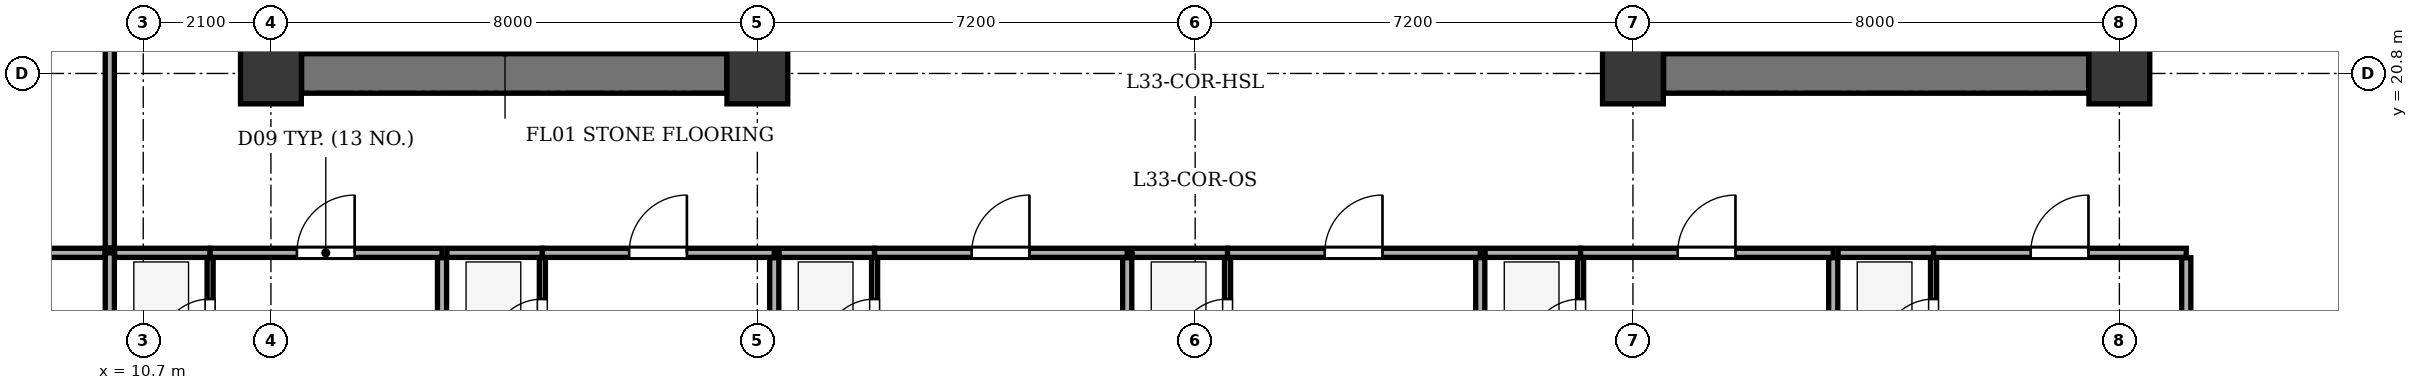
"""IFC4 building model, lengths in metres.
Left out: names, types, materials, properties, quantities, classifications, styles, units other than length and angle.
Written with IfcOpenShell. Run it as: python <this file> out.ifc"""

import sys

from ifc_helpers import new_model, si_unit, direction, frame, frame_2d, origin, origin_2d, place, context, subcontext, project, spatial, rectangle, extrude, element, fill, save


model = new_model("IFC4")
c1 = context("Model", 3, precision=1e-05, world=origin(), true_north=direction((0.0, 1.0)))
c2 = subcontext(c1, "Body", "Model", "MODEL_VIEW")
j1 = project(units=[si_unit("LENGTHUNIT", "METRE"), si_unit("PLANEANGLEUNIT", "RADIAN")], contexts=[c1])
p1 = place(None, origin())
s1 = spatial("IfcSite", under=j1, at=p1, CompositionType="ELEMENT")
p2 = place(p1, origin())
s2 = spatial("IfcBuilding", under=s1, at=p2, CompositionType="ELEMENT")
p3 = place(p2, frame((0.0, 0.0, 134.3)))
s3 = spatial("IfcBuildingStorey", under=s2, at=p3, CompositionType="ELEMENT", Elevation=134.3)
for number, where, z_axis, x_axis in (
    (1, (12.8, 20.8, 0.0), (0.0, 0.0, 1.0), (1.0, 0.0, 0.0)),
    (2, (20.8, 20.8, 0.0), (0.0, 0.0, 1.0), (1.0, 0.0, 0.0)),
    (3, (35.2, 20.8, 0.0), (0.0, 0.0, 1.0), (1.0, 0.0, 0.0)),
    (4, (43.2, 20.8, 0.0), (0.0, 0.0, 1.0), (1.0, 0.0, 0.0)),
):
    element("IfcColumn", number, at=place(p3, frame(where, z_axis=z_axis, x_axis=x_axis)), inside=s3, PredefinedType="COLUMN", context=c2, shape_type="SweptSolid", body=[
        extrude(rectangle(XDim=1.0, YDim=1.0, at=origin_2d()), origin(), (0.0, 0.0, 1.0), 3.5),
    ])
p4 = place(p3, frame((13.305, 20.8, 0.0), z_axis=(0.0, 0.0, 1.0), x_axis=(1.0, 0.0, 0.0)))
e5 = element("IfcWall", 5, at=p4, inside=s3, PredefinedType="SHEAR", context=c2, shape_type="SweptSolid", body=[
    extrude(rectangle(XDim=6.99, YDim=0.65, at=frame_2d((3.495, 0.0))), origin(), (0.0, 0.0, 1.0), 3.2),
])
p5 = place(p3, frame((16.435, 21.135, 0.0), z_axis=(0.0, 0.0, 1.0), x_axis=(0.0, 1.0, 0.0)))
e6 = element("IfcWall", 6, at=p5, inside=s3, PredefinedType="SHEAR", context=c2, shape_type="SweptSolid", body=[
    extrude(rectangle(XDim=12.13, YDim=0.25, at=frame_2d((6.065, 0.0))), origin(), (0.0, 0.0, 1.0), 3.2),
])
p6 = place(p5, frame((0.515, 0.0, 0.0)))
e7 = element("IfcOpeningElement", 7, at=p6, cuts=e6, PredefinedType="OPENING", context=c2, shape_type="SweptSolid", body=[
    extrude(rectangle(XDim=1.2, YDim=2.15, at=frame_2d((0.6, 1.075))), frame((0.0, 0.135, 0.0), z_axis=(0.0, -1.0, 0.0), x_axis=(1.0, 0.0, 0.0)), (0.0, 0.0, 1.0), 0.27),
])
p7 = place(p5, frame((2.665, 0.0, 0.0)))
e8 = element("IfcOpeningElement", 8, at=p7, cuts=e6, PredefinedType="OPENING", context=c2, shape_type="SweptSolid", body=[
    extrude(rectangle(XDim=1.15, YDim=2.15, at=frame_2d((0.575, 1.075))), frame((0.0, 0.135, 0.0), z_axis=(0.0, -1.0, 0.0), x_axis=(1.0, 0.0, 0.0)), (0.0, 0.0, 1.0), 0.27),
])
p8 = place(p3, frame((35.705, 20.8, 0.0), z_axis=(0.0, 0.0, 1.0), x_axis=(1.0, 0.0, 0.0)))
e9 = element("IfcWall", 9, at=p8, inside=s3, PredefinedType="SHEAR", context=c2, shape_type="SweptSolid", body=[
    extrude(rectangle(XDim=6.99, YDim=0.65, at=frame_2d((3.495, 0.0))), origin(), (0.0, 0.0, 1.0), 3.2),
])
p9 = place(p3, frame((39.565, 21.135, 0.0), z_axis=(0.0, 0.0, 1.0), x_axis=(0.0, 1.0, 0.0)))
e10 = element("IfcWall", 10, at=p9, inside=s3, PredefinedType="SHEAR", context=c2, shape_type="SweptSolid", body=[
    extrude(rectangle(XDim=12.13, YDim=0.25, at=frame_2d((6.065, 0.0))), origin(), (0.0, 0.0, 1.0), 3.2),
])
p10 = place(p9, frame((0.515, 0.0, 0.0)))
e11 = element("IfcOpeningElement", 11, at=p10, cuts=e10, PredefinedType="OPENING", context=c2, shape_type="SweptSolid", body=[
    extrude(rectangle(XDim=1.2, YDim=2.15, at=frame_2d((0.6, 1.075))), frame((0.0, 0.135, 0.0), z_axis=(0.0, -1.0, 0.0), x_axis=(1.0, 0.0, 0.0)), (0.0, 0.0, 1.0), 0.27),
])
p11 = place(p9, frame((2.665, 0.0, 0.0)))
e12 = element("IfcOpeningElement", 12, at=p11, cuts=e10, PredefinedType="OPENING", context=c2, shape_type="SweptSolid", body=[
    extrude(rectangle(XDim=1.15, YDim=2.15, at=frame_2d((0.575, 1.075))), frame((0.0, 0.135, 0.0), z_axis=(0.0, -1.0, 0.0), x_axis=(1.0, 0.0, 0.0)), (0.0, 0.0, 1.0), 0.27),
])
p12 = place(p3, frame((10.15, 1.875, 0.0), z_axis=(0.0, 0.0, 1.0), x_axis=(0.0, 1.0, 0.0)))
e13 = element("IfcWall", 13, at=p12, inside=s3, PredefinedType="PARTITIONING", context=c2, shape_type="SweptSolid", body=[
    extrude(rectangle(XDim=15.975, YDim=0.15, at=frame_2d((7.988, 0.0))), origin(), (0.0, 0.0, 1.0), 3.2),
])
p13 = place(p3, frame((10.23, 17.85, 0.0), z_axis=(0.0, 0.0, 1.0), x_axis=(1.0, 0.0, 0.0)))
e14 = element("IfcWall", 14, at=p13, inside=s3, PredefinedType="PARTITIONING", context=c2, shape_type="SweptSolid", body=[
    extrude(rectangle(XDim=1.57, YDim=0.15, at=frame_2d((0.785, 0.0))), origin(), (0.0, 0.0, 1.0), 3.2),
])
p14 = place(p3, frame((11.8, 17.85, 0.0), z_axis=(0.0, 0.0, 1.0), x_axis=(1.0, 0.0, 0.0)))
e15 = element("IfcWall", 15, at=p14, inside=s3, PredefinedType="PARTITIONING", context=c2, shape_type="SweptSolid", body=[
    extrude(rectangle(XDim=3.814, YDim=0.15, at=frame_2d((1.907, 0.0))), origin(), (0.0, 0.0, 1.0), 3.2),
])
p15 = place(p14, frame((1.427, 0.0, 0.0)))
e16 = element("IfcOpeningElement", 16, at=p15, cuts=e15, PredefinedType="OPENING", context=c2, shape_type="SweptSolid", body=[
    extrude(rectangle(XDim=0.95, YDim=2.1, at=frame_2d((0.475, 1.05))), frame((0.0, 0.085, 0.0), z_axis=(0.0, -1.0, 0.0), x_axis=(1.0, 0.0, 0.0)), (0.0, 0.0, 1.0), 0.17),
])
p16 = place(p3, frame((11.8, 15.52, 0.0), z_axis=(0.0, 0.0, 1.0), x_axis=(0.0, 1.0, 0.0)))
e17 = element("IfcWall", 17, at=p16, inside=s3, PredefinedType="PARTITIONING", context=c2, shape_type="SweptSolid", body=[
    extrude(rectangle(XDim=2.25, YDim=0.1, at=frame_2d((1.125, 0.0))), origin(), (0.0, 0.0, 1.0), 3.2),
])
p17 = place(p16, frame((0.72, 0.0, 0.0)))
e18 = element("IfcOpeningElement", 18, at=p17, cuts=e17, PredefinedType="OPENING", context=c2, shape_type="SweptSolid", body=[
    extrude(rectangle(XDim=0.85, YDim=2.05, at=frame_2d((0.425, 1.025))), frame((0.0, 0.06, 0.0), z_axis=(0.0, -1.0, 0.0), x_axis=(1.0, 0.0, 0.0)), (0.0, 0.0, 1.0), 0.12),
])
p18 = place(p3, frame((15.614, 1.875, 0.0), z_axis=(0.0, 0.0, 1.0), x_axis=(0.0, 1.0, 0.0)))
e19 = element("IfcWall", 19, at=p18, inside=s3, PredefinedType="PARTITIONING", context=c2, shape_type="SweptSolid", body=[
    extrude(rectangle(XDim=15.895, YDim=0.15, at=frame_2d((7.948, 0.0))), origin(), (0.0, 0.0, 1.0), 3.2),
])
p19 = place(p3, frame((15.694, 17.85, 0.0), z_axis=(0.0, 0.0, 1.0), x_axis=(1.0, 0.0, 0.0)))
e20 = element("IfcWall", 20, at=p19, inside=s3, PredefinedType="PARTITIONING", context=c2, shape_type="SweptSolid", body=[
    extrude(rectangle(XDim=1.57, YDim=0.15, at=frame_2d((0.785, 0.0))), origin(), (0.0, 0.0, 1.0), 3.2),
])
p20 = place(p3, frame((17.264, 17.85, 0.0), z_axis=(0.0, 0.0, 1.0), x_axis=(1.0, 0.0, 0.0)))
e21 = element("IfcWall", 21, at=p20, inside=s3, PredefinedType="PARTITIONING", context=c2, shape_type="SweptSolid", body=[
    extrude(rectangle(XDim=3.814, YDim=0.15, at=frame_2d((1.907, 0.0))), origin(), (0.0, 0.0, 1.0), 3.2),
])
p21 = place(p20, frame((1.427, 0.0, 0.0)))
e22 = element("IfcOpeningElement", 22, at=p21, cuts=e21, PredefinedType="OPENING", context=c2, shape_type="SweptSolid", body=[
    extrude(rectangle(XDim=0.95, YDim=2.1, at=frame_2d((0.475, 1.05))), frame((0.0, 0.085, 0.0), z_axis=(0.0, -1.0, 0.0), x_axis=(1.0, 0.0, 0.0)), (0.0, 0.0, 1.0), 0.17),
])
p22 = place(p3, frame((17.264, 15.52, 0.0), z_axis=(0.0, 0.0, 1.0), x_axis=(0.0, 1.0, 0.0)))
e23 = element("IfcWall", 23, at=p22, inside=s3, PredefinedType="PARTITIONING", context=c2, shape_type="SweptSolid", body=[
    extrude(rectangle(XDim=2.25, YDim=0.1, at=frame_2d((1.125, 0.0))), origin(), (0.0, 0.0, 1.0), 3.2),
])
p23 = place(p22, frame((0.72, 0.0, 0.0)))
e24 = element("IfcOpeningElement", 24, at=p23, cuts=e23, PredefinedType="OPENING", context=c2, shape_type="SweptSolid", body=[
    extrude(rectangle(XDim=0.85, YDim=2.05, at=frame_2d((0.425, 1.025))), frame((0.0, 0.06, 0.0), z_axis=(0.0, -1.0, 0.0), x_axis=(1.0, 0.0, 0.0)), (0.0, 0.0, 1.0), 0.12),
])
p24 = place(p3, frame((21.078, 1.875, 0.0), z_axis=(0.0, 0.0, 1.0), x_axis=(0.0, 1.0, 0.0)))
e25 = element("IfcWall", 25, at=p24, inside=s3, PredefinedType="PARTITIONING", context=c2, shape_type="SweptSolid", body=[
    extrude(rectangle(XDim=15.895, YDim=0.15, at=frame_2d((7.948, 0.0))), origin(), (0.0, 0.0, 1.0), 2.535),
])
p25 = place(p3, frame((21.158, 17.85, 0.0), z_axis=(0.0, 0.0, 1.0), x_axis=(1.0, 0.0, 0.0)))
e26 = element("IfcWall", 26, at=p25, inside=s3, PredefinedType="PARTITIONING", context=c2, shape_type="SweptSolid", body=[
    extrude(rectangle(XDim=1.57, YDim=0.15, at=frame_2d((0.785, 0.0))), origin(), (0.0, 0.0, 1.0), 3.2),
])
p26 = place(p3, frame((22.728, 17.85, 0.0), z_axis=(0.0, 0.0, 1.0), x_axis=(1.0, 0.0, 0.0)))
e27 = element("IfcWall", 27, at=p26, inside=s3, PredefinedType="PARTITIONING", context=c2, shape_type="SweptSolid", body=[
    extrude(rectangle(XDim=4.155, YDim=0.15, at=frame_2d((2.078, 0.0))), origin(), (0.0, 0.0, 1.0), 3.2),
])
p27 = place(p26, frame((1.597, 0.0, 0.0)))
e28 = element("IfcOpeningElement", 28, at=p27, cuts=e27, PredefinedType="OPENING", context=c2, shape_type="SweptSolid", body=[
    extrude(rectangle(XDim=0.95, YDim=2.1, at=frame_2d((0.475, 1.05))), frame((0.0, 0.085, 0.0), z_axis=(0.0, -1.0, 0.0), x_axis=(1.0, 0.0, 0.0)), (0.0, 0.0, 1.0), 0.17),
])
p28 = place(p3, frame((22.728, 15.52, 0.0), z_axis=(0.0, 0.0, 1.0), x_axis=(0.0, 1.0, 0.0)))
e29 = element("IfcWall", 29, at=p28, inside=s3, PredefinedType="PARTITIONING", context=c2, shape_type="SweptSolid", body=[
    extrude(rectangle(XDim=2.25, YDim=0.1, at=frame_2d((1.125, 0.0))), origin(), (0.0, 0.0, 1.0), 3.2),
])
p29 = place(p28, frame((0.72, 0.0, 0.0)))
e30 = element("IfcOpeningElement", 30, at=p29, cuts=e29, PredefinedType="OPENING", context=c2, shape_type="SweptSolid", body=[
    extrude(rectangle(XDim=0.85, YDim=2.05, at=frame_2d((0.425, 1.025))), frame((0.0, 0.06, 0.0), z_axis=(0.0, -1.0, 0.0), x_axis=(1.0, 0.0, 0.0)), (0.0, 0.0, 1.0), 0.12),
])
p30 = place(p3, frame((26.883, 1.875, 0.0), z_axis=(0.0, 0.0, 1.0), x_axis=(0.0, 1.0, 0.0)))
e31 = element("IfcWall", 31, at=p30, inside=s3, PredefinedType="PARTITIONING", context=c2, shape_type="SweptSolid", body=[
    extrude(rectangle(XDim=15.895, YDim=0.15, at=frame_2d((7.948, 0.0))), origin(), (0.0, 0.0, 1.0), 3.2),
])
p31 = place(p3, frame((26.963, 17.85, 0.0), z_axis=(0.0, 0.0, 1.0), x_axis=(1.0, 0.0, 0.0)))
e32 = element("IfcWall", 32, at=p31, inside=s3, PredefinedType="PARTITIONING", context=c2, shape_type="SweptSolid", body=[
    extrude(rectangle(XDim=1.57, YDim=0.15, at=frame_2d((0.785, 0.0))), origin(), (0.0, 0.0, 1.0), 3.2),
])
p32 = place(p3, frame((28.533, 17.85, 0.0), z_axis=(0.0, 0.0, 1.0), x_axis=(1.0, 0.0, 0.0)))
e33 = element("IfcWall", 33, at=p32, inside=s3, PredefinedType="PARTITIONING", context=c2, shape_type="SweptSolid", body=[
    extrude(rectangle(XDim=4.156, YDim=0.15, at=frame_2d((2.078, 0.0))), origin(), (0.0, 0.0, 1.0), 3.2),
])
p33 = place(p32, frame((1.598, 0.0, 0.0)))
e34 = element("IfcOpeningElement", 34, at=p33, cuts=e33, PredefinedType="OPENING", context=c2, shape_type="SweptSolid", body=[
    extrude(rectangle(XDim=0.95, YDim=2.1, at=frame_2d((0.475, 1.05))), frame((0.0, 0.085, 0.0), z_axis=(0.0, -1.0, 0.0), x_axis=(1.0, 0.0, 0.0)), (0.0, 0.0, 1.0), 0.17),
])
p34 = place(p3, frame((28.533, 15.52, 0.0), z_axis=(0.0, 0.0, 1.0), x_axis=(0.0, 1.0, 0.0)))
e35 = element("IfcWall", 35, at=p34, inside=s3, PredefinedType="PARTITIONING", context=c2, shape_type="SweptSolid", body=[
    extrude(rectangle(XDim=2.25, YDim=0.1, at=frame_2d((1.125, 0.0))), origin(), (0.0, 0.0, 1.0), 3.2),
])
p35 = place(p34, frame((0.72, 0.0, 0.0)))
e36 = element("IfcOpeningElement", 36, at=p35, cuts=e35, PredefinedType="OPENING", context=c2, shape_type="SweptSolid", body=[
    extrude(rectangle(XDim=0.85, YDim=2.05, at=frame_2d((0.425, 1.025))), frame((0.0, 0.06, 0.0), z_axis=(0.0, -1.0, 0.0), x_axis=(1.0, 0.0, 0.0)), (0.0, 0.0, 1.0), 0.12),
])
p36 = place(p3, frame((32.689, 1.875, 0.0), z_axis=(0.0, 0.0, 1.0), x_axis=(0.0, 1.0, 0.0)))
e37 = element("IfcWall", 37, at=p36, inside=s3, PredefinedType="PARTITIONING", context=c2, shape_type="SweptSolid", body=[
    extrude(rectangle(XDim=15.895, YDim=0.15, at=frame_2d((7.948, 0.0))), origin(), (0.0, 0.0, 1.0), 3.2),
])
p37 = place(p3, frame((32.769, 17.85, 0.0), z_axis=(0.0, 0.0, 1.0), x_axis=(1.0, 0.0, 0.0)))
e38 = element("IfcWall", 38, at=p37, inside=s3, PredefinedType="PARTITIONING", context=c2, shape_type="SweptSolid", body=[
    extrude(rectangle(XDim=1.57, YDim=0.15, at=frame_2d((0.785, 0.0))), origin(), (0.0, 0.0, 1.0), 3.2),
])
p38 = place(p3, frame((34.339, 17.85, 0.0), z_axis=(0.0, 0.0, 1.0), x_axis=(1.0, 0.0, 0.0)))
e39 = element("IfcWall", 39, at=p38, inside=s3, PredefinedType="PARTITIONING", context=c2, shape_type="SweptSolid", body=[
    extrude(rectangle(XDim=4.155, YDim=0.15, at=frame_2d((2.077, 0.0))), origin(), (0.0, 0.0, 1.0), 3.2),
])
p39 = place(p38, frame((1.597, 0.0, 0.0)))
e40 = element("IfcOpeningElement", 40, at=p39, cuts=e39, PredefinedType="OPENING", context=c2, shape_type="SweptSolid", body=[
    extrude(rectangle(XDim=0.95, YDim=2.1, at=frame_2d((0.475, 1.05))), frame((0.0, 0.085, 0.0), z_axis=(0.0, -1.0, 0.0), x_axis=(1.0, 0.0, 0.0)), (0.0, 0.0, 1.0), 0.17),
])
p40 = place(p3, frame((34.339, 15.52, 0.0), z_axis=(0.0, 0.0, 1.0), x_axis=(0.0, 1.0, 0.0)))
e41 = element("IfcWall", 41, at=p40, inside=s3, PredefinedType="PARTITIONING", context=c2, shape_type="SweptSolid", body=[
    extrude(rectangle(XDim=2.25, YDim=0.1, at=frame_2d((1.125, 0.0))), origin(), (0.0, 0.0, 1.0), 3.2),
])
p41 = place(p40, frame((0.72, 0.0, 0.0)))
e42 = element("IfcOpeningElement", 42, at=p41, cuts=e41, PredefinedType="OPENING", context=c2, shape_type="SweptSolid", body=[
    extrude(rectangle(XDim=0.85, YDim=2.05, at=frame_2d((0.425, 1.025))), frame((0.0, 0.06, 0.0), z_axis=(0.0, -1.0, 0.0), x_axis=(1.0, 0.0, 0.0)), (0.0, 0.0, 1.0), 0.12),
])
p42 = place(p3, frame((38.494, 1.875, 0.0), z_axis=(0.0, 0.0, 1.0), x_axis=(0.0, 1.0, 0.0)))
e43 = element("IfcWall", 43, at=p42, inside=s3, PredefinedType="PARTITIONING", context=c2, shape_type="SweptSolid", body=[
    extrude(rectangle(XDim=15.895, YDim=0.15, at=frame_2d((7.948, 0.0))), origin(), (0.0, 0.0, 1.0), 3.2),
])
p43 = place(p3, frame((38.574, 17.85, 0.0), z_axis=(0.0, 0.0, 1.0), x_axis=(1.0, 0.0, 0.0)))
e44 = element("IfcWall", 44, at=p43, inside=s3, PredefinedType="PARTITIONING", context=c2, shape_type="SweptSolid", body=[
    extrude(rectangle(XDim=1.57, YDim=0.15, at=frame_2d((0.785, 0.0))), origin(), (0.0, 0.0, 1.0), 3.2),
])
p44 = place(p3, frame((40.144, 17.85, 0.0), z_axis=(0.0, 0.0, 1.0), x_axis=(1.0, 0.0, 0.0)))
e45 = element("IfcWall", 45, at=p44, inside=s3, PredefinedType="PARTITIONING", context=c2, shape_type="SweptSolid", body=[
    extrude(rectangle(XDim=4.156, YDim=0.15, at=frame_2d((2.078, 0.0))), origin(), (0.0, 0.0, 1.0), 3.2),
])
p45 = place(p44, frame((1.598, 0.0, 0.0)))
e46 = element("IfcOpeningElement", 46, at=p45, cuts=e45, PredefinedType="OPENING", context=c2, shape_type="SweptSolid", body=[
    extrude(rectangle(XDim=0.95, YDim=2.1, at=frame_2d((0.475, 1.05))), frame((0.0, 0.085, 0.0), z_axis=(0.0, -1.0, 0.0), x_axis=(1.0, 0.0, 0.0)), (0.0, 0.0, 1.0), 0.17),
])
p46 = place(p3, frame((40.144, 15.52, 0.0), z_axis=(0.0, 0.0, 1.0), x_axis=(0.0, 1.0, 0.0)))
e47 = element("IfcWall", 47, at=p46, inside=s3, PredefinedType="PARTITIONING", context=c2, shape_type="SweptSolid", body=[
    extrude(rectangle(XDim=2.25, YDim=0.1, at=frame_2d((1.125, 0.0))), origin(), (0.0, 0.0, 1.0), 3.2),
])
p47 = place(p46, frame((0.72, 0.0, 0.0)))
e48 = element("IfcOpeningElement", 48, at=p47, cuts=e47, PredefinedType="OPENING", context=c2, shape_type="SweptSolid", body=[
    extrude(rectangle(XDim=0.85, YDim=2.05, at=frame_2d((0.425, 1.025))), frame((0.0, 0.06, 0.0), z_axis=(0.0, -1.0, 0.0), x_axis=(1.0, 0.0, 0.0)), (0.0, 0.0, 1.0), 0.12),
])
p48 = place(p3, frame((44.3, 1.875, 0.0), z_axis=(0.0, 0.0, 1.0), x_axis=(0.0, 1.0, 0.0)))
e49 = element("IfcWall", 49, at=p48, inside=s3, PredefinedType="PARTITIONING", context=c2, shape_type="SweptSolid", body=[
    extrude(rectangle(XDim=15.895, YDim=0.15, at=frame_2d((7.948, 0.0))), origin(), (0.0, 0.0, 1.0), 3.2),
])
p49 = place(p3, frame((4.675, 17.85, 0.0), z_axis=(0.0, 0.0, 1.0), x_axis=(1.0, 0.0, 0.0)))
e50 = element("IfcWall", 50, at=p49, inside=s3, PredefinedType="PARTITIONING", context=c2, shape_type="SweptSolid", body=[
    extrude(rectangle(XDim=5.395, YDim=0.15, at=frame_2d((2.698, 0.0))), origin(), (0.0, 0.0, 1.0), 3.2),
])
p50 = place(p3, frame((10.15, 17.93, 0.0), z_axis=(0.0, 0.0, 1.0), x_axis=(0.0, 1.0, 0.0)))
e51 = element("IfcWall", 51, at=p50, inside=s3, PredefinedType="PARTITIONING", context=c2, shape_type="SweptSolid", body=[
    extrude(rectangle(XDim=9.27, YDim=0.15, at=frame_2d((4.635, 0.0))), origin(), (0.0, 0.0, 1.0), 3.2),
])
p51 = place(p50, frame((4.115, 0.0, 0.0)))
e52 = element("IfcOpeningElement", 52, at=p51, cuts=e51, PredefinedType="OPENING", context=c2, shape_type="SweptSolid", body=[
    extrude(rectangle(XDim=0.95, YDim=2.1, at=frame_2d((0.475, 1.05))), frame((0.0, 0.085, 0.0), z_axis=(0.0, -1.0, 0.0), x_axis=(1.0, 0.0, 0.0)), (0.0, 0.0, 1.0), 0.17),
])
p52 = place(p17, origin())
e53 = element("IfcDoor", 53, at=p52, inside=s3, OperationType="SINGLE_SWING_LEFT", PredefinedType="DOOR", context=c2, shape_type="SweptSolid", body=[
    extrude(rectangle(XDim=0.85, YDim=2.05, at=frame_2d((0.425, 1.025))), frame((0.0, 0.025, 0.0), z_axis=(0.0, -1.0, 0.0), x_axis=(1.0, 0.0, 0.0)), (0.0, 0.0, 1.0), 0.05),
])
fill(e18, e53)
p53 = place(p15, origin())
e54 = element("IfcDoor", 54, at=p53, inside=s3, OperationType="SINGLE_SWING_RIGHT", PredefinedType="DOOR", context=c2, shape_type="SweptSolid", body=[
    extrude(rectangle(XDim=0.95, YDim=2.1, at=frame_2d((0.475, 1.05))), frame((0.0, 0.025, 0.0), z_axis=(0.0, -1.0, 0.0), x_axis=(1.0, 0.0, 0.0)), (0.0, 0.0, 1.0), 0.05),
])
fill(e16, e54)
p54 = place(p23, origin())
e55 = element("IfcDoor", 55, at=p54, inside=s3, OperationType="SINGLE_SWING_LEFT", PredefinedType="DOOR", context=c2, shape_type="SweptSolid", body=[
    extrude(rectangle(XDim=0.85, YDim=2.05, at=frame_2d((0.425, 1.025))), frame((0.0, 0.025, 0.0), z_axis=(0.0, -1.0, 0.0), x_axis=(1.0, 0.0, 0.0)), (0.0, 0.0, 1.0), 0.05),
])
fill(e24, e55)
p55 = place(p21, origin())
e56 = element("IfcDoor", 56, at=p55, inside=s3, OperationType="SINGLE_SWING_RIGHT", PredefinedType="DOOR", context=c2, shape_type="SweptSolid", body=[
    extrude(rectangle(XDim=0.95, YDim=2.1, at=frame_2d((0.475, 1.05))), frame((0.0, 0.025, 0.0), z_axis=(0.0, -1.0, 0.0), x_axis=(1.0, 0.0, 0.0)), (0.0, 0.0, 1.0), 0.05),
])
fill(e22, e56)
p56 = place(p29, origin())
e57 = element("IfcDoor", 57, at=p56, inside=s3, OperationType="SINGLE_SWING_LEFT", PredefinedType="DOOR", context=c2, shape_type="SweptSolid", body=[
    extrude(rectangle(XDim=0.85, YDim=2.05, at=frame_2d((0.425, 1.025))), frame((0.0, 0.025, 0.0), z_axis=(0.0, -1.0, 0.0), x_axis=(1.0, 0.0, 0.0)), (0.0, 0.0, 1.0), 0.05),
])
fill(e30, e57)
p57 = place(p27, origin())
e58 = element("IfcDoor", 58, at=p57, inside=s3, OperationType="SINGLE_SWING_RIGHT", PredefinedType="DOOR", context=c2, shape_type="SweptSolid", body=[
    extrude(rectangle(XDim=0.95, YDim=2.1, at=frame_2d((0.475, 1.05))), frame((0.0, 0.025, 0.0), z_axis=(0.0, -1.0, 0.0), x_axis=(1.0, 0.0, 0.0)), (0.0, 0.0, 1.0), 0.05),
])
fill(e28, e58)
p58 = place(p35, origin())
e59 = element("IfcDoor", 59, at=p58, inside=s3, OperationType="SINGLE_SWING_LEFT", PredefinedType="DOOR", context=c2, shape_type="SweptSolid", body=[
    extrude(rectangle(XDim=0.85, YDim=2.05, at=frame_2d((0.425, 1.025))), frame((0.0, 0.025, 0.0), z_axis=(0.0, -1.0, 0.0), x_axis=(1.0, 0.0, 0.0)), (0.0, 0.0, 1.0), 0.05),
])
fill(e36, e59)
p59 = place(p33, origin())
e60 = element("IfcDoor", 60, at=p59, inside=s3, OperationType="SINGLE_SWING_RIGHT", PredefinedType="DOOR", context=c2, shape_type="SweptSolid", body=[
    extrude(rectangle(XDim=0.95, YDim=2.1, at=frame_2d((0.475, 1.05))), frame((0.0, 0.025, 0.0), z_axis=(0.0, -1.0, 0.0), x_axis=(1.0, 0.0, 0.0)), (0.0, 0.0, 1.0), 0.05),
])
fill(e34, e60)
p60 = place(p41, origin())
e61 = element("IfcDoor", 61, at=p60, inside=s3, OperationType="SINGLE_SWING_LEFT", PredefinedType="DOOR", context=c2, shape_type="SweptSolid", body=[
    extrude(rectangle(XDim=0.85, YDim=2.05, at=frame_2d((0.425, 1.025))), frame((0.0, 0.025, 0.0), z_axis=(0.0, -1.0, 0.0), x_axis=(1.0, 0.0, 0.0)), (0.0, 0.0, 1.0), 0.05),
])
fill(e42, e61)
p61 = place(p39, origin())
e62 = element("IfcDoor", 62, at=p61, inside=s3, OperationType="SINGLE_SWING_RIGHT", PredefinedType="DOOR", context=c2, shape_type="SweptSolid", body=[
    extrude(rectangle(XDim=0.95, YDim=2.1, at=frame_2d((0.475, 1.05))), frame((0.0, 0.025, 0.0), z_axis=(0.0, -1.0, 0.0), x_axis=(1.0, 0.0, 0.0)), (0.0, 0.0, 1.0), 0.05),
])
fill(e40, e62)
p62 = place(p47, origin())
e63 = element("IfcDoor", 63, at=p62, inside=s3, OperationType="SINGLE_SWING_LEFT", PredefinedType="DOOR", context=c2, shape_type="SweptSolid", body=[
    extrude(rectangle(XDim=0.85, YDim=2.05, at=frame_2d((0.425, 1.025))), frame((0.0, 0.025, 0.0), z_axis=(0.0, -1.0, 0.0), x_axis=(1.0, 0.0, 0.0)), (0.0, 0.0, 1.0), 0.05),
])
fill(e48, e63)
p63 = place(p45, origin())
e64 = element("IfcDoor", 64, at=p63, inside=s3, OperationType="SINGLE_SWING_RIGHT", PredefinedType="DOOR", context=c2, shape_type="SweptSolid", body=[
    extrude(rectangle(XDim=0.95, YDim=2.1, at=frame_2d((0.475, 1.05))), frame((0.0, 0.025, 0.0), z_axis=(0.0, -1.0, 0.0), x_axis=(1.0, 0.0, 0.0)), (0.0, 0.0, 1.0), 0.05),
])
fill(e46, e64)
save(model, sys.argv[1])
